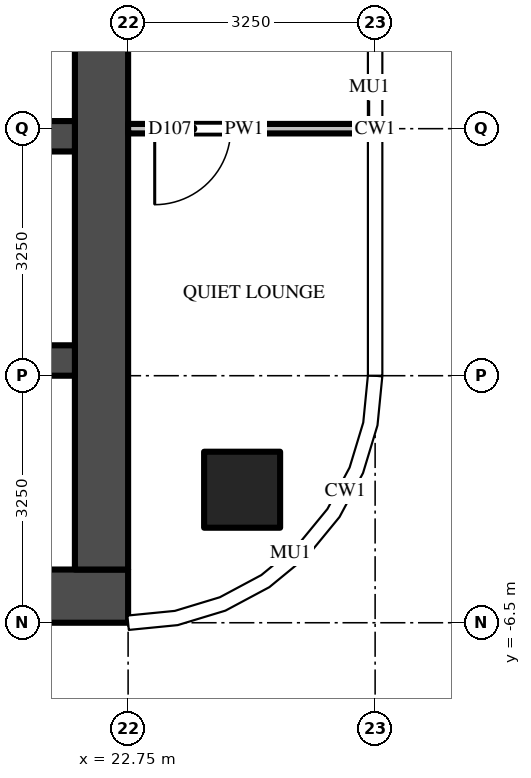
"""IFC4 building model, lengths in metres.
Left out: names, types, materials, properties, quantities, classifications, styles, units other than length and angle.
Written with IfcOpenShell. Run it as: python <this file> out.ifc"""

import sys

from ifc_helpers import new_model, si_unit, direction, frame, frame_2d, origin, origin_2d, place, context, subcontext, project, spatial, rectangle, extrude, source, transform, mapped, element, fill, save


model = new_model("IFC4")
c1 = context("Model", 3, precision=1e-05, world=origin(), true_north=direction((0.0, 1.0)))
c2 = subcontext(c1, "Body", "Model", "MODEL_VIEW")
j1 = project(units=[si_unit("LENGTHUNIT", "METRE"), si_unit("PLANEANGLEUNIT", "RADIAN")], contexts=[c1])
p1 = place(None, origin())
s1 = spatial("IfcSite", under=j1, at=p1, CompositionType="ELEMENT")
p2 = place(p1, origin())
s2 = spatial("IfcBuilding", under=s1, at=p2, CompositionType="ELEMENT")
p3 = place(p2, frame((0.0, 0.0, 291.1)))
s3 = spatial("IfcBuildingStorey", under=s2, at=p3, CompositionType="ELEMENT", Elevation=291.1)
m1 = source(origin(), c2, "Body", "SweptSolid", [
    extrude(rectangle(XDim=1.0, YDim=1.0, at=origin_2d()), origin(), (0.0, 0.0, 1.0), 3.9),
])
p4 = place(p3, frame((24.25, -4.75, 0.0), z_axis=(0.0, 0.0, 1.0), x_axis=(1.0, 0.0, 0.0)))
e1 = element("IfcColumn", 1, at=p4, inside=s3, PredefinedType="COLUMN", context=c2, shape_type="MappedRepresentation", body=[
    mapped(m1, transform((0.0, 0.0, 0.0))),
])
m2 = source(origin(), c2, "Body", "SweptSolid", [
    extrude(rectangle(XDim=16.65, YDim=0.7, at=frame_2d((8.325, 0.0))), origin(), (0.0, 0.0, 1.0), 3.7),
])
p5 = place(p3, frame((6.1, -6.15, 0.0), z_axis=(0.0, 0.0, 1.0), x_axis=(1.0, 0.0, 0.0)))
e2 = element("IfcWall", 2, at=p5, inside=s3, PredefinedType="SHEAR", context=c2, shape_type="MappedRepresentation", body=[
    mapped(m2, transform((0.0, 0.0, 0.0))),
])
m3 = source(origin(), c2, "Body", "SweptSolid", [
    extrude(rectangle(XDim=9.05, YDim=0.7, at=frame_2d((4.525, 0.0))), origin(), (0.0, 0.0, 1.0), 3.7),
])
p6 = place(p3, frame((22.4, -5.8, 0.0), z_axis=(0.0, 0.0, 1.0), x_axis=(0.0, 1.0, 0.0)))
e3 = element("IfcWall", 3, at=p6, inside=s3, PredefinedType="SHEAR", context=c2, shape_type="MappedRepresentation", body=[
    mapped(m3, transform((0.0, 0.0, 0.0))),
])
m4 = source(origin(), c2, "Body", "SweptSolid", [
    extrude(rectangle(XDim=14.85, YDim=0.4, at=frame_2d((7.425, 0.0))), origin(), (0.0, 0.0, 1.0), 3.7),
])
p7 = place(p3, frame((7.2, -0.1, 0.0), z_axis=(0.0, 0.0, 1.0), x_axis=(1.0, 0.0, 0.0)))
e4 = element("IfcWall", 4, at=p7, inside=s3, PredefinedType="SHEAR", context=c2, shape_type="MappedRepresentation", body=[
    mapped(m4, transform((0.0, 0.0, 0.0))),
])
m5 = source(origin(), c2, "Body", "SweptSolid", [
    extrude(rectangle(XDim=1.0, YDim=2.1, at=frame_2d((0.5, 1.05))), frame((0.0, 0.21, 0.0), z_axis=(0.0, -1.0, 0.0), x_axis=(1.0, 0.0, 0.0)), (0.0, 0.0, 1.0), 0.42),
])
p8 = place(p7, frame((7.9, 0.0, 0.0)))
e5 = element("IfcOpeningElement", 5, at=p8, cuts=e4, PredefinedType="OPENING", context=c2, shape_type="MappedRepresentation", body=[
    mapped(m5, transform((0.0, 0.0, 0.0))),
])
m6 = source(origin(), c2, "Body", "SweptSolid", [
    extrude(rectangle(XDim=5.7, YDim=0.4, at=frame_2d((2.85, 0.0))), origin(), (0.0, 0.0, 1.0), 3.7),
])
p9 = place(p3, frame((16.35, -3.05, 0.0), z_axis=(0.0, 0.0, 1.0), x_axis=(1.0, 0.0, 0.0)))
e6 = element("IfcWall", 6, at=p9, inside=s3, PredefinedType="SHEAR", context=c2, shape_type="MappedRepresentation", body=[
    mapped(m6, transform((0.0, 0.0, 0.0))),
])
m7 = source(origin(), c2, "Body", "SweptSolid", [
    extrude(rectangle(XDim=3.05, YDim=0.125, at=frame_2d((1.525, 0.0))), origin(), (0.0, 0.0, 1.0), 2.78),
])
p10 = place(p3, frame((25.8, 0.0, 0.0), z_axis=(0.0, 0.0, 1.0), x_axis=(-1.0, 0.0, 0.0)))
e7 = element("IfcWall", 7, at=p10, inside=s3, PredefinedType="PARTITIONING", context=c2, shape_type="MappedRepresentation", body=[
    mapped(m7, transform((0.0, 0.0, 0.0))),
])
m8 = source(origin(), c2, "Body", "SweptSolid", [
    extrude(rectangle(XDim=1.0, YDim=2.1, at=frame_2d((0.5, 1.05))), frame((0.0, 0.073, 0.0), z_axis=(0.0, -1.0, 0.0), x_axis=(1.0, 0.0, 0.0)), (0.0, 0.0, 1.0), 0.145),
])
p11 = place(p10, frame((1.7, 0.0, 0.0)))
e8 = element("IfcOpeningElement", 8, at=p11, cuts=e7, PredefinedType="OPENING", context=c2, shape_type="MappedRepresentation", body=[
    mapped(m8, transform((0.0, 0.0, 0.0))),
])
m9 = source(origin(), c2, "Body", "SweptSolid", [
    extrude(rectangle(XDim=1.0, YDim=2.1, at=frame_2d((0.5, 1.05))), frame((0.0, 0.025, 0.0), z_axis=(0.0, -1.0, 0.0), x_axis=(1.0, 0.0, 0.0)), (0.0, 0.0, 1.0), 0.05),
])
p12 = place(p11, origin())
e9 = element("IfcDoor", 9, at=p12, inside=s3, OperationType="SINGLE_SWING_RIGHT", PredefinedType="DOOR", context=c2, shape_type="MappedRepresentation", body=[
    mapped(m9, transform((0.0, 0.0, 0.0))),
])
fill(e8, e9)
save(model, sys.argv[1])
